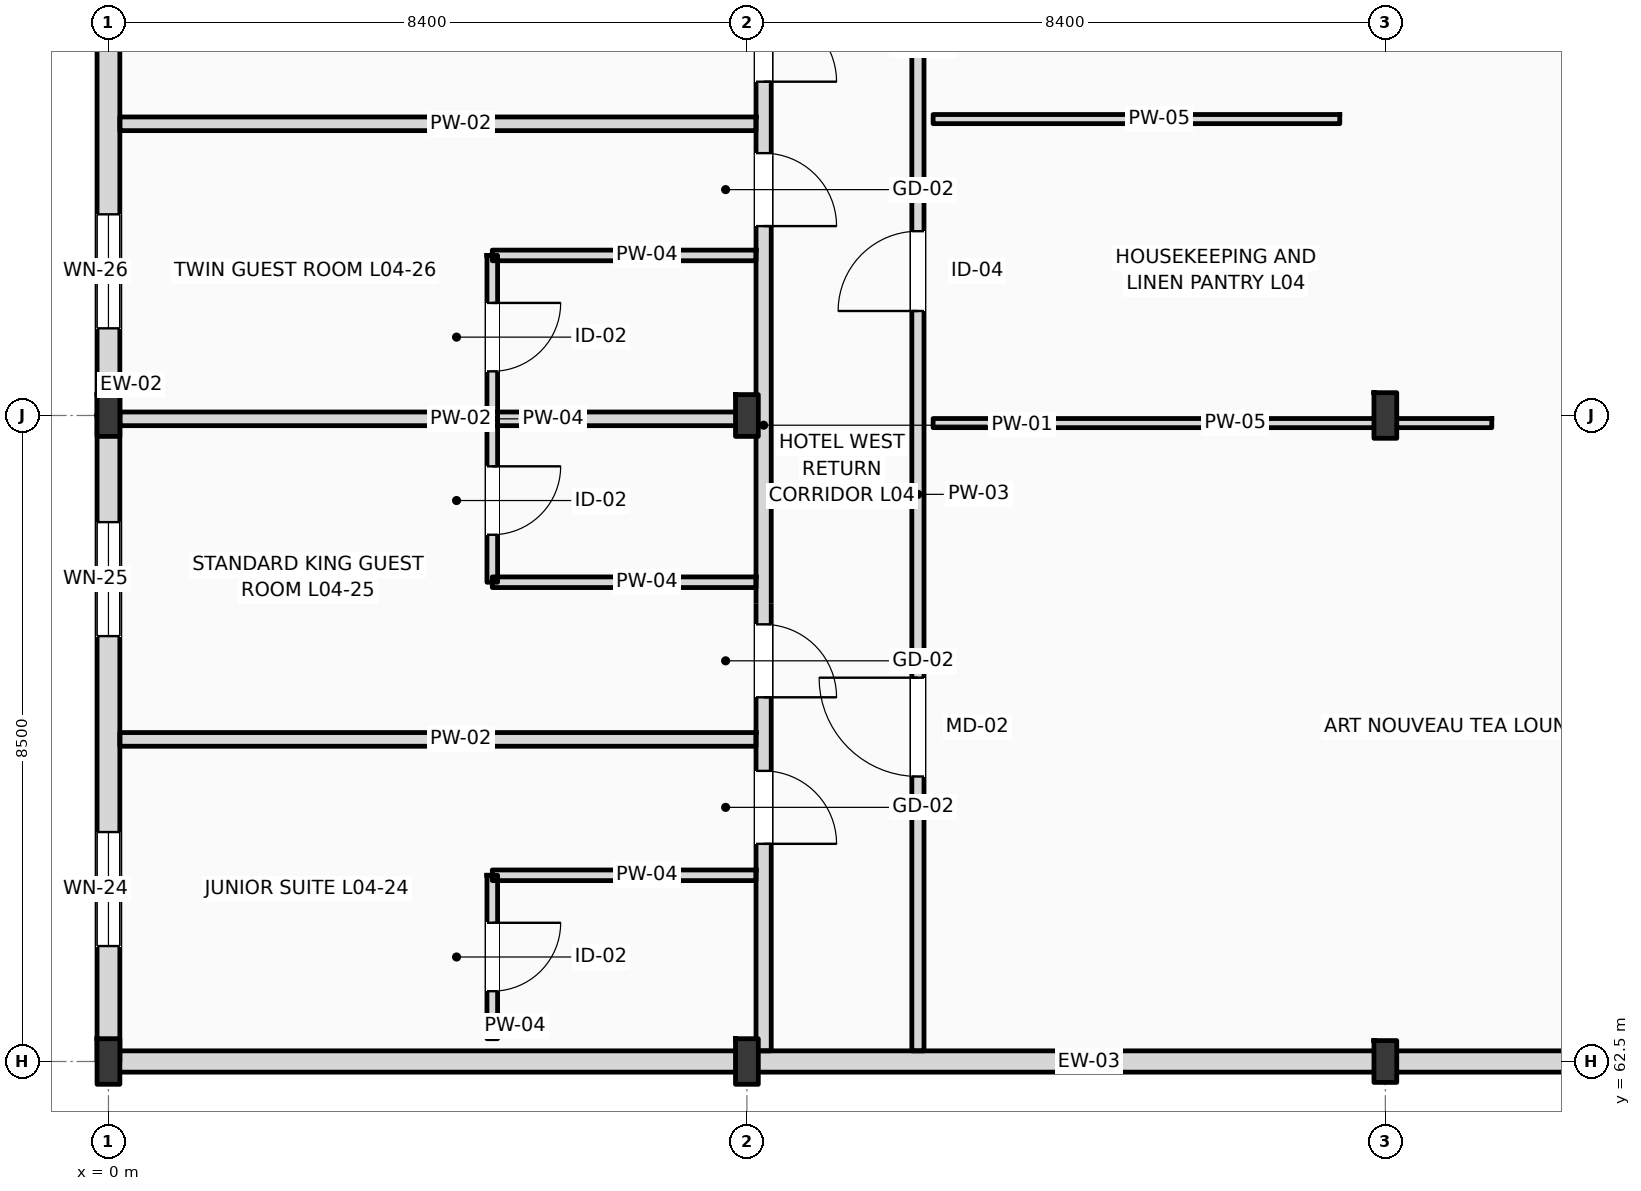
"""IFC4 building model, lengths in metres.
Left out: names, types, materials, properties, quantities, classifications, styles, units other than length and angle.
Written with IfcOpenShell. Run it as: python <this file> out.ifc"""

import sys

from ifc_helpers import new_model, si_unit, direction, frame, frame_2d, origin, origin_2d, place, context, subcontext, project, spatial, rectangle, i_section, extrude, element, fill, save


model = new_model("IFC4")
c1 = context("Model", 3, precision=1e-05, world=origin(), true_north=direction((0.0, 1.0)))
c2 = subcontext(c1, "Body", "Model", "MODEL_VIEW")
j1 = project(units=[si_unit("LENGTHUNIT", "METRE"), si_unit("PLANEANGLEUNIT", "RADIAN")], contexts=[c1])
p1 = place(None, origin())
s1 = spatial("IfcSite", under=j1, at=p1, CompositionType="ELEMENT")
p2 = place(p1, origin())
s2 = spatial("IfcBuilding", under=s1, at=p2, CompositionType="ELEMENT")
p3 = place(p2, frame((0.0, 0.0, 20.4)))
s3 = spatial("IfcBuildingStorey", under=s2, at=p3, CompositionType="ELEMENT", Elevation=20.4)
p4 = place(p3, frame((0.0, 62.5, 0.0), z_axis=(0.0, 0.0, 1.0), x_axis=(1.0, 0.0, 0.0)))
e1 = element("IfcColumn", 1, at=p4, inside=s3, PredefinedType="COLUMN", context=c2, shape_type="SweptSolid", body=[
    extrude(i_section(OverallWidth=0.3, OverallDepth=0.6, WebThickness=0.015, FlangeThickness=0.03, FilletRadius=0.027, at=origin_2d()), origin(), (0.0, 0.0, 1.0), 4.2),
])
p5 = place(p3, frame((0.0, 71.0, 0.0), z_axis=(0.0, 0.0, 1.0), x_axis=(1.0, 0.0, 0.0)))
e2 = element("IfcColumn", 2, at=p5, inside=s3, PredefinedType="COLUMN", context=c2, shape_type="SweptSolid", body=[
    extrude(i_section(OverallWidth=0.3, OverallDepth=0.55, WebThickness=0.015, FlangeThickness=0.029, FilletRadius=0.027, at=origin_2d()), origin(), (0.0, 0.0, 1.0), 4.2),
])
p6 = place(p3, frame((8.4, 62.5, 0.0), z_axis=(0.0, 0.0, 1.0), x_axis=(1.0, 0.0, 0.0)))
e3 = element("IfcColumn", 3, at=p6, inside=s3, PredefinedType="COLUMN", context=c2, shape_type="SweptSolid", body=[
    extrude(i_section(OverallWidth=0.3, OverallDepth=0.6, WebThickness=0.015, FlangeThickness=0.03, FilletRadius=0.027, at=origin_2d()), origin(), (0.0, 0.0, 1.0), 4.2),
])
for number, where, z_axis, x_axis in (
    (4, (8.4, 71.0, 0.0), (0.0, 0.0, 1.0), (1.0, 0.0, 0.0)),
    (5, (16.8, 62.5, 0.0), (0.0, 0.0, 1.0), (1.0, 0.0, 0.0)),
):
    element("IfcColumn", number, at=place(p3, frame(where, z_axis=z_axis, x_axis=x_axis)), inside=s3, PredefinedType="COLUMN", context=c2, shape_type="SweptSolid", body=[
        extrude(i_section(OverallWidth=0.3, OverallDepth=0.55, WebThickness=0.015, FlangeThickness=0.029, FilletRadius=0.027, at=origin_2d()), origin(), (0.0, 0.0, 1.0), 4.2),
    ])
p7 = place(p3, frame((16.8, 71.0, 0.0), z_axis=(0.0, 0.0, 1.0), x_axis=(1.0, 0.0, 0.0)))
e6 = element("IfcColumn", 6, at=p7, inside=s3, PredefinedType="COLUMN", context=c2, shape_type="SweptSolid", body=[
    extrude(i_section(OverallWidth=0.3, OverallDepth=0.6, WebThickness=0.015, FlangeThickness=0.03, FilletRadius=0.027, at=origin_2d()), origin(), (0.0, 0.0, 1.0), 4.2),
])
p8 = place(p3, frame((0.0, 62.5, 0.0), z_axis=(0.0, 0.0, 1.0), x_axis=(0.0, 1.0, 0.0)))
e7 = element("IfcWall", 7, at=p8, inside=s3, PredefinedType="STANDARD", context=c2, shape_type="SweptSolid", body=[
    extrude(rectangle(XDim=8.5, YDim=0.3, at=frame_2d((4.25, 0.0))), origin(), (0.0, 0.0, 1.0), 3.53),
])
p9 = place(p8, frame((1.519, 0.0, 0.9)))
e8 = element("IfcOpeningElement", 8, at=p9, cuts=e7, PredefinedType="OPENING", context=c2, shape_type="SweptSolid", body=[
    extrude(rectangle(XDim=1.5, YDim=1.75, at=frame_2d((0.75, 0.875))), frame((0.0, 0.16, 0.0), z_axis=(0.0, -1.0, 0.0), x_axis=(1.0, 0.0, 0.0)), (0.0, 0.0, 1.0), 0.32),
])
p10 = place(p8, frame((5.597, 0.0, 0.9)))
e9 = element("IfcOpeningElement", 9, at=p10, cuts=e7, PredefinedType="OPENING", context=c2, shape_type="SweptSolid", body=[
    extrude(rectangle(XDim=1.5, YDim=2.3, at=frame_2d((0.75, 1.15))), frame((0.0, 0.16, 0.0), z_axis=(0.0, -1.0, 0.0), x_axis=(1.0, 0.0, 0.0)), (0.0, 0.0, 1.0), 0.32),
])
p11 = place(p3, frame((0.0, 71.0, 0.0), z_axis=(0.0, 0.0, 1.0), x_axis=(0.0, 1.0, 0.0)))
e10 = element("IfcWall", 10, at=p11, inside=s3, PredefinedType="STANDARD", context=c2, shape_type="SweptSolid", body=[
    extrude(rectangle(XDim=8.5, YDim=0.3, at=frame_2d((4.25, 0.0))), origin(), (0.0, 0.0, 1.0), 3.53),
])
p12 = place(p11, frame((1.147, 0.0, 0.9)))
e11 = element("IfcOpeningElement", 11, at=p12, cuts=e10, PredefinedType="OPENING", context=c2, shape_type="SweptSolid", body=[
    extrude(rectangle(XDim=1.5, YDim=2.45, at=frame_2d((0.75, 1.225))), frame((0.0, 0.16, 0.0), z_axis=(0.0, -1.0, 0.0), x_axis=(1.0, 0.0, 0.0)), (0.0, 0.0, 1.0), 0.32),
])
p13 = place(p11, frame((5.197, 0.0, 0.9)))
e12 = element("IfcOpeningElement", 12, at=p13, cuts=e10, PredefinedType="OPENING", context=c2, shape_type="SweptSolid", body=[
    extrude(rectangle(XDim=1.5, YDim=2.45, at=frame_2d((0.75, 1.225))), frame((0.0, 0.16, 0.0), z_axis=(0.0, -1.0, 0.0), x_axis=(1.0, 0.0, 0.0)), (0.0, 0.0, 1.0), 0.32),
])
p14 = place(p3, frame((0.0, 62.5, 0.0), z_axis=(0.0, 0.0, 1.0), x_axis=(1.0, 0.0, 0.0)))
e13 = element("IfcWall", 13, at=p14, inside=s3, PredefinedType="STANDARD", context=c2, shape_type="SweptSolid", body=[
    extrude(rectangle(XDim=25.2, YDim=0.28, at=frame_2d((12.6, 0.0))), origin(), (0.0, 0.0, 1.0), 3.38),
])
p15 = place(p3, frame((8.62, 62.64, 0.0), z_axis=(0.0, 0.0, 1.0), x_axis=(0.0, 1.0, 0.0)))
e14 = element("IfcWall", 14, at=p15, inside=s3, PredefinedType="PARTITIONING", context=c2, shape_type="SweptSolid", body=[
    extrude(rectangle(XDim=32.66, YDim=0.2, at=frame_2d((16.33, 0.0))), origin(), (0.0, 0.0, 1.0), 3.53),
])
p16 = place(p15, frame((2.724, 0.0, 0.0)))
e15 = element("IfcOpeningElement", 15, at=p16, cuts=e14, PredefinedType="OPENING", context=c2, shape_type="SweptSolid", body=[
    extrude(rectangle(XDim=0.96, YDim=2.2, at=frame_2d((0.48, 1.1))), frame((0.0, 0.11, 0.0), z_axis=(0.0, -1.0, 0.0), x_axis=(1.0, 0.0, 0.0)), (0.0, 0.0, 1.0), 0.22),
])
p17 = place(p15, frame((4.652, 0.0, 0.0)))
e16 = element("IfcOpeningElement", 16, at=p17, cuts=e14, PredefinedType="OPENING", context=c2, shape_type="SweptSolid", body=[
    extrude(rectangle(XDim=0.96, YDim=2.2, at=frame_2d((0.48, 1.1))), frame((0.0, 0.11, 0.0), z_axis=(0.0, -1.0, 0.0), x_axis=(1.0, 0.0, 0.0)), (0.0, 0.0, 1.0), 0.22),
])
p18 = place(p15, frame((10.852, 0.0, 0.0)))
e17 = element("IfcOpeningElement", 17, at=p18, cuts=e14, PredefinedType="OPENING", context=c2, shape_type="SweptSolid", body=[
    extrude(rectangle(XDim=0.96, YDim=2.2, at=frame_2d((0.48, 1.1))), frame((0.0, 0.11, 0.0), z_axis=(0.0, -1.0, 0.0), x_axis=(1.0, 0.0, 0.0)), (0.0, 0.0, 1.0), 0.22),
])
p19 = place(p15, frame((12.752, 0.0, 0.0)))
e18 = element("IfcOpeningElement", 18, at=p19, cuts=e14, PredefinedType="OPENING", context=c2, shape_type="SweptSolid", body=[
    extrude(rectangle(XDim=0.96, YDim=2.2, at=frame_2d((0.48, 1.1))), frame((0.0, 0.11, 0.0), z_axis=(0.0, -1.0, 0.0), x_axis=(1.0, 0.0, 0.0)), (0.0, 0.0, 1.0), 0.22),
])
p20 = place(p15, frame((18.952, 0.0, 0.0)))
e19 = element("IfcOpeningElement", 19, at=p20, cuts=e14, PredefinedType="OPENING", context=c2, shape_type="SweptSolid", body=[
    extrude(rectangle(XDim=0.96, YDim=2.2, at=frame_2d((0.48, 1.1))), frame((0.0, 0.11, 0.0), z_axis=(0.0, -1.0, 0.0), x_axis=(1.0, 0.0, 0.0)), (0.0, 0.0, 1.0), 0.22),
])
p21 = place(p15, frame((23.002, 0.0, 0.0)))
e20 = element("IfcOpeningElement", 20, at=p21, cuts=e14, PredefinedType="OPENING", context=c2, shape_type="SweptSolid", body=[
    extrude(rectangle(XDim=0.96, YDim=2.2, at=frame_2d((0.48, 1.1))), frame((0.0, 0.11, 0.0), z_axis=(0.0, -1.0, 0.0), x_axis=(1.0, 0.0, 0.0)), (0.0, 0.0, 1.0), 0.22),
])
p22 = place(p15, frame((27.052, 0.0, 0.0)))
e21 = element("IfcOpeningElement", 21, at=p22, cuts=e14, PredefinedType="OPENING", context=c2, shape_type="SweptSolid", body=[
    extrude(rectangle(XDim=0.96, YDim=2.2, at=frame_2d((0.48, 1.1))), frame((0.0, 0.11, 0.0), z_axis=(0.0, -1.0, 0.0), x_axis=(1.0, 0.0, 0.0)), (0.0, 0.0, 1.0), 0.22),
])
p23 = place(p15, frame((31.074, 0.0, 0.0)))
e22 = element("IfcOpeningElement", 22, at=p23, cuts=e14, PredefinedType="OPENING", context=c2, shape_type="SweptSolid", body=[
    extrude(rectangle(XDim=0.96, YDim=2.2, at=frame_2d((0.48, 1.1))), frame((0.0, 0.11, 0.0), z_axis=(0.0, -1.0, 0.0), x_axis=(1.0, 0.0, 0.0)), (0.0, 0.0, 1.0), 0.22),
])
p24 = place(p3, frame((10.65, 62.64, 0.0), z_axis=(0.0, 0.0, 1.0), x_axis=(0.0, 1.0, 0.0)))
e23 = element("IfcWall", 23, at=p24, inside=s3, PredefinedType="PARTITIONING", context=c2, shape_type="SweptSolid", body=[
    extrude(rectangle(XDim=16.31, YDim=0.16, at=frame_2d((8.155, 0.0))), origin(), (0.0, 0.0, 1.0), 3.94),
])
p25 = place(p24, frame((3.61, 0.0, 0.0)))
e24 = element("IfcOpeningElement", 24, at=p25, cuts=e23, PredefinedType="OPENING", context=c2, shape_type="SweptSolid", body=[
    extrude(rectangle(XDim=1.3, YDim=2.2, at=frame_2d((0.65, 1.1))), frame((0.0, 0.09, 0.0), z_axis=(0.0, -1.0, 0.0), x_axis=(1.0, 0.0, 0.0)), (0.0, 0.0, 1.0), 0.18),
])
p26 = place(p24, frame((9.735, 0.0, 0.0)))
e25 = element("IfcOpeningElement", 25, at=p26, cuts=e23, PredefinedType="OPENING", context=c2, shape_type="SweptSolid", body=[
    extrude(rectangle(XDim=1.05, YDim=2.12, at=frame_2d((0.525, 1.06))), frame((0.0, 0.09, 0.0), z_axis=(0.0, -1.0, 0.0), x_axis=(1.0, 0.0, 0.0)), (0.0, 0.0, 1.0), 0.18),
])
p27 = place(p24, frame((13.49, 0.0, 0.0)))
e26 = element("IfcOpeningElement", 26, at=p27, cuts=e23, PredefinedType="OPENING", context=c2, shape_type="SweptSolid", body=[
    extrude(rectangle(XDim=0.94, YDim=2.15, at=frame_2d((0.47, 1.075))), frame((0.0, 0.09, 0.0), z_axis=(0.0, -1.0, 0.0), x_axis=(1.0, 0.0, 0.0)), (0.0, 0.0, 1.0), 0.18),
])
p28 = place(p3, frame((0.15, 66.738, 0.0), z_axis=(0.0, 0.0, 1.0), x_axis=(1.0, 0.0, 0.0)))
e27 = element("IfcWall", 27, at=p28, inside=s3, PredefinedType="PARTITIONING", context=c2, shape_type="SweptSolid", body=[
    extrude(rectangle(XDim=8.37, YDim=0.18, at=frame_2d((4.185, 0.0))), origin(), (0.0, 0.0, 1.0), 3.94),
])
p29 = place(p3, frame((5.05, 64.95, 0.0), z_axis=(0.0, 0.0, 1.0), x_axis=(1.0, 0.0, 0.0)))
e28 = element("IfcWall", 28, at=p29, inside=s3, PredefinedType="PARTITIONING", context=c2, shape_type="SweptSolid", body=[
    extrude(rectangle(XDim=3.47, YDim=0.14, at=frame_2d((1.735, 0.0))), origin(), (0.0, 0.0, 1.0), 3.94),
])
p30 = place(p3, frame((5.05, 62.8, 0.0), z_axis=(0.0, 0.0, 1.0), x_axis=(0.0, 1.0, 0.0)))
e29 = element("IfcWall", 29, at=p30, inside=s3, PredefinedType="PARTITIONING", context=c2, shape_type="SweptSolid", body=[
    extrude(rectangle(XDim=2.15, YDim=0.14, at=frame_2d((1.075, 0.0))), origin(), (0.0, 0.0, 1.0), 3.94),
])
p31 = place(p30, frame((0.625, 0.0, 0.0)))
e30 = element("IfcOpeningElement", 30, at=p31, cuts=e29, PredefinedType="OPENING", context=c2, shape_type="SweptSolid", body=[
    extrude(rectangle(XDim=0.9, YDim=2.1, at=frame_2d((0.45, 1.05))), frame((0.0, 0.08, 0.0), z_axis=(0.0, -1.0, 0.0), x_axis=(1.0, 0.0, 0.0)), (0.0, 0.0, 1.0), 0.16),
])
p32 = place(p3, frame((0.15, 70.956, 0.0), z_axis=(0.0, 0.0, 1.0), x_axis=(1.0, 0.0, 0.0)))
e31 = element("IfcWall", 31, at=p32, inside=s3, PredefinedType="PARTITIONING", context=c2, shape_type="SweptSolid", body=[
    extrude(rectangle(XDim=8.37, YDim=0.18, at=frame_2d((4.185, 0.0))), origin(), (0.0, 0.0, 1.0), 3.38),
])
p33 = place(p3, frame((5.05, 68.806, 0.0), z_axis=(0.0, 0.0, 1.0), x_axis=(1.0, 0.0, 0.0)))
e32 = element("IfcWall", 32, at=p33, inside=s3, PredefinedType="PARTITIONING", context=c2, shape_type="SweptSolid", body=[
    extrude(rectangle(XDim=3.47, YDim=0.14, at=frame_2d((1.735, 0.0))), origin(), (0.0, 0.0, 1.0), 3.94),
])
p34 = place(p3, frame((5.05, 68.806, 0.0), z_axis=(0.0, 0.0, 1.0), x_axis=(0.0, 1.0, 0.0)))
e33 = element("IfcWall", 33, at=p34, inside=s3, PredefinedType="PARTITIONING", context=c2, shape_type="SweptSolid", body=[
    extrude(rectangle(XDim=2.15, YDim=0.14, at=frame_2d((1.075, 0.0))), origin(), (0.0, 0.0, 1.0), 3.94),
])
p35 = place(p34, frame((0.625, 0.0, 0.0)))
e34 = element("IfcOpeningElement", 34, at=p35, cuts=e33, PredefinedType="OPENING", context=c2, shape_type="SweptSolid", body=[
    extrude(rectangle(XDim=0.9, YDim=2.1, at=frame_2d((0.45, 1.05))), frame((0.0, 0.08, 0.0), z_axis=(0.0, -1.0, 0.0), x_axis=(1.0, 0.0, 0.0)), (0.0, 0.0, 1.0), 0.16),
])
p36 = place(p3, frame((0.15, 74.838, 0.0), z_axis=(0.0, 0.0, 1.0), x_axis=(1.0, 0.0, 0.0)))
e35 = element("IfcWall", 35, at=p36, inside=s3, PredefinedType="PARTITIONING", context=c2, shape_type="SweptSolid", body=[
    extrude(rectangle(XDim=8.37, YDim=0.18, at=frame_2d((4.185, 0.0))), origin(), (0.0, 0.0, 1.0), 3.94),
])
p37 = place(p3, frame((5.05, 73.106, 0.0), z_axis=(0.0, 0.0, 1.0), x_axis=(1.0, 0.0, 0.0)))
e36 = element("IfcWall", 36, at=p37, inside=s3, PredefinedType="PARTITIONING", context=c2, shape_type="SweptSolid", body=[
    extrude(rectangle(XDim=3.47, YDim=0.14, at=frame_2d((1.735, 0.0))), origin(), (0.0, 0.0, 1.0), 3.94),
])
p38 = place(p3, frame((5.05, 70.956, 0.0), z_axis=(0.0, 0.0, 1.0), x_axis=(0.0, 1.0, 0.0)))
e37 = element("IfcWall", 37, at=p38, inside=s3, PredefinedType="PARTITIONING", context=c2, shape_type="SweptSolid", body=[
    extrude(rectangle(XDim=2.15, YDim=0.14, at=frame_2d((1.075, 0.0))), origin(), (0.0, 0.0, 1.0), 3.94),
])
p39 = place(p38, frame((0.625, 0.0, 0.0)))
e38 = element("IfcOpeningElement", 38, at=p39, cuts=e37, PredefinedType="OPENING", context=c2, shape_type="SweptSolid", body=[
    extrude(rectangle(XDim=0.9, YDim=2.1, at=frame_2d((0.45, 1.05))), frame((0.0, 0.08, 0.0), z_axis=(0.0, -1.0, 0.0), x_axis=(1.0, 0.0, 0.0)), (0.0, 0.0, 1.0), 0.16),
])
p40 = place(p3, frame((10.85, 70.9, 0.0), z_axis=(0.0, 0.0, 1.0), x_axis=(1.0, 0.0, 0.0)))
e39 = element("IfcWall", 39, at=p40, inside=s3, PredefinedType="PARTITIONING", context=c2, shape_type="SweptSolid", body=[
    extrude(rectangle(XDim=7.35, YDim=0.12, at=frame_2d((3.675, 0.0))), origin(), (0.0, 0.0, 1.0), 3.38),
])
p41 = place(p3, frame((10.85, 74.9, 0.0), z_axis=(0.0, 0.0, 1.0), x_axis=(1.0, 0.0, 0.0)))
e40 = element("IfcWall", 40, at=p41, inside=s3, PredefinedType="PARTITIONING", context=c2, shape_type="SweptSolid", body=[
    extrude(rectangle(XDim=5.35, YDim=0.12, at=frame_2d((2.675, 0.0))), origin(), (0.0, 0.0, 1.0), 3.94),
])
p42 = place(p9, origin())
e41 = element("IfcWindow", 41, at=p42, inside=s3, PartitioningType="DOUBLE_PANEL_VERTICAL", PredefinedType="WINDOW", context=c2, shape_type="SweptSolid", body=[
    extrude(rectangle(XDim=1.5, YDim=1.75, at=frame_2d((0.75, 0.875))), frame((0.0, 0.03, 0.0), z_axis=(0.0, -1.0, 0.0), x_axis=(1.0, 0.0, 0.0)), (0.0, 0.0, 1.0), 0.06),
])
fill(e8, e41)
p43 = place(p10, origin())
e42 = element("IfcWindow", 42, at=p43, inside=s3, PartitioningType="DOUBLE_PANEL_VERTICAL", PredefinedType="WINDOW", context=c2, shape_type="SweptSolid", body=[
    extrude(rectangle(XDim=1.5, YDim=2.3, at=frame_2d((0.75, 1.15))), frame((0.0, 0.03, 0.0), z_axis=(0.0, -1.0, 0.0), x_axis=(1.0, 0.0, 0.0)), (0.0, 0.0, 1.0), 0.06),
])
fill(e9, e42)
p44 = place(p12, origin())
e43 = element("IfcWindow", 43, at=p44, inside=s3, PartitioningType="DOUBLE_PANEL_VERTICAL", PredefinedType="WINDOW", context=c2, shape_type="SweptSolid", body=[
    extrude(rectangle(XDim=1.5, YDim=2.45, at=frame_2d((0.75, 1.225))), frame((0.0, 0.03, 0.0), z_axis=(0.0, -1.0, 0.0), x_axis=(1.0, 0.0, 0.0)), (0.0, 0.0, 1.0), 0.06),
])
fill(e11, e43)
p45 = place(p16, frame((0.96, 0.0, 0.0), z_axis=(0.0, 0.0, 1.0), x_axis=(-1.0, 0.0, 0.0)))
e44 = element("IfcDoor", 44, at=p45, inside=s3, OperationType="SINGLE_SWING_LEFT", PredefinedType="DOOR", context=c2, shape_type="SweptSolid", body=[
    extrude(rectangle(XDim=0.96, YDim=2.2, at=frame_2d((0.48, 1.1))), frame((0.0, 0.025, 0.0), z_axis=(0.0, -1.0, 0.0), x_axis=(1.0, 0.0, 0.0)), (0.0, 0.0, 1.0), 0.05),
])
fill(e15, e44)
p46 = place(p31, frame((0.9, 0.0, 0.0), z_axis=(0.0, 0.0, 1.0), x_axis=(-1.0, 0.0, 0.0)))
e45 = element("IfcDoor", 45, at=p46, inside=s3, OperationType="SINGLE_SWING_RIGHT", PredefinedType="DOOR", context=c2, shape_type="SweptSolid", body=[
    extrude(rectangle(XDim=0.9, YDim=2.1, at=frame_2d((0.45, 1.05))), frame((0.0, 0.025, 0.0), z_axis=(0.0, -1.0, 0.0), x_axis=(1.0, 0.0, 0.0)), (0.0, 0.0, 1.0), 0.05),
])
fill(e30, e45)
p47 = place(p17, frame((0.96, 0.0, 0.0), z_axis=(0.0, 0.0, 1.0), x_axis=(-1.0, 0.0, 0.0)))
e46 = element("IfcDoor", 46, at=p47, inside=s3, OperationType="SINGLE_SWING_LEFT", PredefinedType="DOOR", context=c2, shape_type="SweptSolid", body=[
    extrude(rectangle(XDim=0.96, YDim=2.2, at=frame_2d((0.48, 1.1))), frame((0.0, 0.025, 0.0), z_axis=(0.0, -1.0, 0.0), x_axis=(1.0, 0.0, 0.0)), (0.0, 0.0, 1.0), 0.05),
])
fill(e16, e46)
p48 = place(p35, frame((0.9, 0.0, 0.0), z_axis=(0.0, 0.0, 1.0), x_axis=(-1.0, 0.0, 0.0)))
e47 = element("IfcDoor", 47, at=p48, inside=s3, OperationType="SINGLE_SWING_RIGHT", PredefinedType="DOOR", context=c2, shape_type="SweptSolid", body=[
    extrude(rectangle(XDim=0.9, YDim=2.1, at=frame_2d((0.45, 1.05))), frame((0.0, 0.025, 0.0), z_axis=(0.0, -1.0, 0.0), x_axis=(1.0, 0.0, 0.0)), (0.0, 0.0, 1.0), 0.05),
])
fill(e34, e47)
p49 = place(p18, frame((0.96, 0.0, 0.0), z_axis=(0.0, 0.0, 1.0), x_axis=(-1.0, 0.0, 0.0)))
e48 = element("IfcDoor", 48, at=p49, inside=s3, OperationType="SINGLE_SWING_LEFT", PredefinedType="DOOR", context=c2, shape_type="SweptSolid", body=[
    extrude(rectangle(XDim=0.96, YDim=2.2, at=frame_2d((0.48, 1.1))), frame((0.0, 0.025, 0.0), z_axis=(0.0, -1.0, 0.0), x_axis=(1.0, 0.0, 0.0)), (0.0, 0.0, 1.0), 0.05),
])
fill(e17, e48)
p50 = place(p39, frame((0.9, 0.0, 0.0), z_axis=(0.0, 0.0, 1.0), x_axis=(-1.0, 0.0, 0.0)))
e49 = element("IfcDoor", 49, at=p50, inside=s3, OperationType="SINGLE_SWING_RIGHT", PredefinedType="DOOR", context=c2, shape_type="SweptSolid", body=[
    extrude(rectangle(XDim=0.9, YDim=2.1, at=frame_2d((0.45, 1.05))), frame((0.0, 0.025, 0.0), z_axis=(0.0, -1.0, 0.0), x_axis=(1.0, 0.0, 0.0)), (0.0, 0.0, 1.0), 0.05),
])
fill(e38, e49)
p51 = place(p19, frame((0.96, 0.0, 0.0), z_axis=(0.0, 0.0, 1.0), x_axis=(-1.0, 0.0, 0.0)))
e50 = element("IfcDoor", 50, at=p51, inside=s3, OperationType="SINGLE_SWING_LEFT", PredefinedType="DOOR", context=c2, shape_type="SweptSolid", body=[
    extrude(rectangle(XDim=0.96, YDim=2.2, at=frame_2d((0.48, 1.1))), frame((0.0, 0.025, 0.0), z_axis=(0.0, -1.0, 0.0), x_axis=(1.0, 0.0, 0.0)), (0.0, 0.0, 1.0), 0.05),
])
fill(e18, e50)
p52 = place(p25, origin())
e51 = element("IfcDoor", 51, at=p52, inside=s3, OperationType="SINGLE_SWING_RIGHT", PredefinedType="DOOR", context=c2, shape_type="SweptSolid", body=[
    extrude(rectangle(XDim=1.3, YDim=2.2, at=frame_2d((0.65, 1.1))), frame((0.0, 0.025, 0.0), z_axis=(0.0, -1.0, 0.0), x_axis=(1.0, 0.0, 0.0)), (0.0, 0.0, 1.0), 0.05),
])
fill(e24, e51)
p53 = place(p26, origin())
e52 = element("IfcDoor", 52, at=p53, inside=s3, OperationType="SINGLE_SWING_LEFT", PredefinedType="DOOR", context=c2, shape_type="SweptSolid", body=[
    extrude(rectangle(XDim=1.05, YDim=2.12, at=frame_2d((0.525, 1.06))), frame((0.0, 0.025, 0.0), z_axis=(0.0, -1.0, 0.0), x_axis=(1.0, 0.0, 0.0)), (0.0, 0.0, 1.0), 0.05),
])
fill(e25, e52)
save(model, sys.argv[1])
